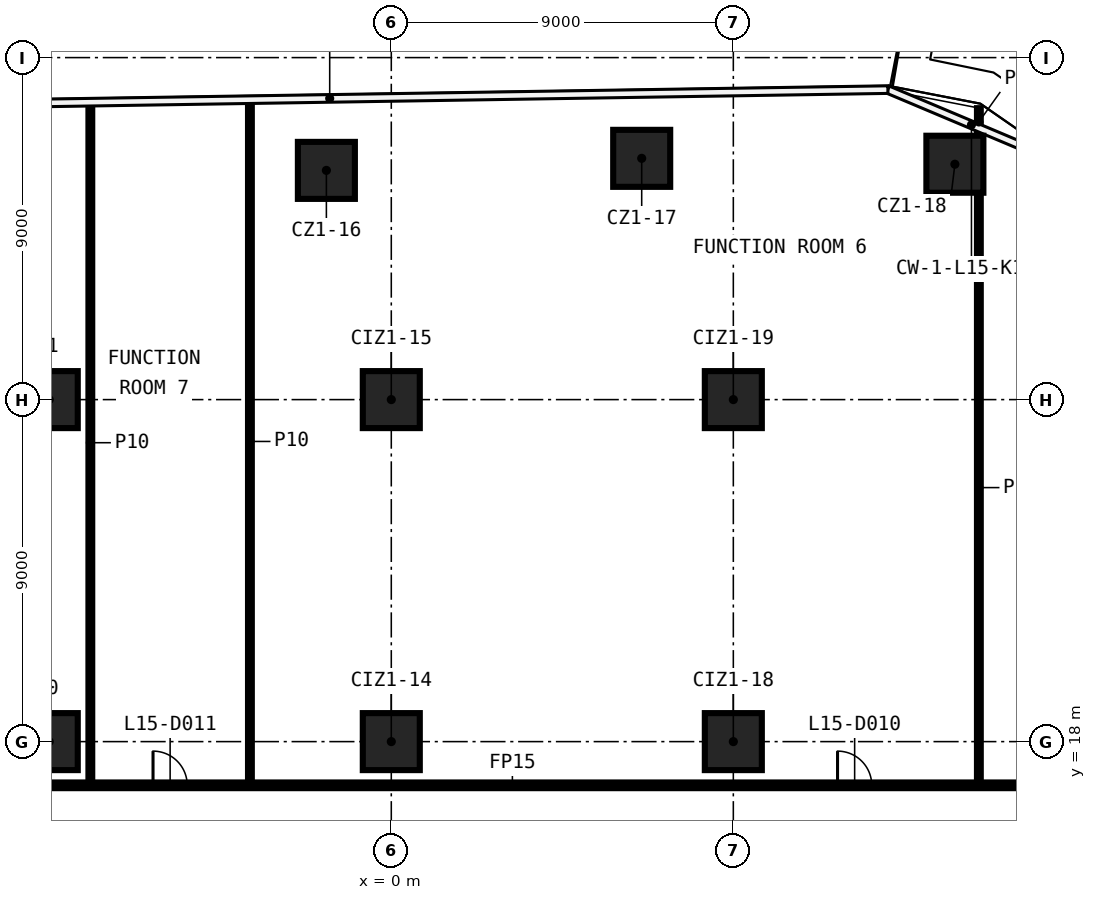
"""IFC4 building model, lengths in metres.
Left out: names, types, materials, properties, quantities, classifications, styles, units other than length and angle.
Written with IfcOpenShell. Run it as: python <this file> out.ifc"""

import sys

from ifc_helpers import new_model, si_unit, direction, frame, frame_2d, origin, origin_2d, place, context, subcontext, project, spatial, rectangle, extrude, element, fill, save


model = new_model("IFC4")
c1 = context("Model", 3, precision=1e-05, world=origin(), true_north=direction((0.0, 1.0)))
c2 = subcontext(c1, "Body", "Model", "MODEL_VIEW")
j1 = project(units=[si_unit("LENGTHUNIT", "METRE"), si_unit("PLANEANGLEUNIT", "RADIAN")], contexts=[c1])
p1 = place(None, origin())
s1 = spatial("IfcSite", under=j1, at=p1, CompositionType="ELEMENT")
p2 = place(p1, origin())
s2 = spatial("IfcBuilding", under=s1, at=p2, CompositionType="ELEMENT")
p3 = place(p2, frame((0.0, 0.0, 77.3)))
s3 = spatial("IfcBuildingStorey", under=s2, at=p3, CompositionType="ELEMENT", Elevation=77.3)
for number, where, z_axis, x_axis in (
    (1, (-1.708, 33.032, 0.0), (0.0, 0.0, 1.0), (1.0, 0.0, 0.0)),
    (2, (6.589, 33.349, 0.0), (0.0, 0.0, 1.0), (1.0, 0.0, 0.0)),
    (3, (14.83, 33.194, 0.0), (0.0, 0.0, 1.0), (1.0, 0.0, 0.0)),
    (4, (-9.0, 18.0, 0.0), (0.0, 0.0, 1.0), (1.0, 0.0, 0.0)),
    (5, (-9.0, 27.0, 0.0), (0.0, 0.0, 1.0), (1.0, 0.0, 0.0)),
    (6, (0.0, 18.0, 0.0), (0.0, 0.0, 1.0), (1.0, 0.0, 0.0)),
    (7, (0.0, 27.0, 0.0), (0.0, 0.0, 1.0), (1.0, 0.0, 0.0)),
    (8, (9.0, 18.0, 0.0), (0.0, 0.0, 1.0), (1.0, 0.0, 0.0)),
    (9, (9.0, 27.0, 0.0), (0.0, 0.0, 1.0), (1.0, 0.0, 0.0)),
):
    element("IfcColumn", number, at=place(p3, frame(where, z_axis=z_axis, x_axis=x_axis)), inside=s3, PredefinedType="COLUMN", context=c2, shape_type="SweptSolid", body=[
        extrude(rectangle(XDim=1.5, YDim=1.5, at=origin_2d()), origin(), (0.0, 0.0, 1.0), 3.3),
    ])
p4 = place(p3, frame((-19.925, 16.85, 0.0), z_axis=(0.0, 0.0, 1.0), x_axis=(1.0, 0.0, 0.0)))
e10 = element("IfcWall", 10, at=p4, inside=s3, PredefinedType="PARTITIONING", context=c2, shape_type="SweptSolid", body=[
    extrude(rectangle(XDim=39.85, YDim=0.15, at=frame_2d((19.925, 0.0))), origin(), (0.0, 0.0, 1.0), 3.3),
])
p5 = place(p4, frame((31.667, 0.0, 0.0)))
e11 = element("IfcOpeningElement", 11, at=p5, cuts=e10, PredefinedType="OPENING", context=c2, shape_type="SweptSolid", body=[
    extrude(rectangle(XDim=0.9, YDim=2.1, at=frame_2d((0.45, 1.05))), frame((0.0, 0.085, 0.0), z_axis=(0.0, -1.0, 0.0), x_axis=(1.0, 0.0, 0.0)), (0.0, 0.0, 1.0), 0.17),
])
p6 = place(p4, frame((13.656, 0.0, 0.0)))
e12 = element("IfcOpeningElement", 12, at=p6, cuts=e10, PredefinedType="OPENING", context=c2, shape_type="SweptSolid", body=[
    extrude(rectangle(XDim=0.9, YDim=2.1, at=frame_2d((0.45, 1.05))), frame((0.0, 0.085, 0.0), z_axis=(0.0, -1.0, 0.0), x_axis=(1.0, 0.0, 0.0)), (0.0, 0.0, 1.0), 0.17),
])
p7 = place(p3, frame((15.461, 16.925, 0.0), z_axis=(0.0, 0.0, 1.0), x_axis=(0.0, 1.0, 0.0)))
e13 = element("IfcWall", 13, at=p7, inside=s3, PredefinedType="PARTITIONING", context=c2, shape_type="SweptSolid", body=[
    extrude(rectangle(XDim=15.519, YDim=0.1, at=frame_2d((7.76, 0.0))), origin(), (0.0, 0.0, 1.0), 3.3),
])
p8 = place(p3, frame((15.461, 33.944, 0.0), z_axis=(0.0, 0.0, 1.0), x_axis=(0.0, 1.0, 0.0)))
e14 = element("IfcWall", 14, at=p8, inside=s3, PredefinedType="PARTITIONING", context=c2, shape_type="SweptSolid", body=[
    extrude(rectangle(XDim=0.725, YDim=0.1, at=frame_2d((0.363, 0.0))), origin(), (0.0, 0.0, 1.0), 3.3),
])
p9 = place(p3, frame((-3.72, 16.925, 0.0), z_axis=(0.0, 0.0, 1.0), x_axis=(0.0, 1.0, 0.0)))
e15 = element("IfcWall", 15, at=p9, inside=s3, PredefinedType="PARTITIONING", context=c2, shape_type="SweptSolid", body=[
    extrude(rectangle(XDim=17.948, YDim=0.1, at=frame_2d((8.974, 0.0))), origin(), (0.0, 0.0, 1.0), 3.3),
])
p10 = place(p3, frame((-7.919, 16.925, 0.0), z_axis=(0.0, 0.0, 1.0), x_axis=(0.0, 1.0, 0.0)))
e16 = element("IfcWall", 16, at=p10, inside=s3, PredefinedType="PARTITIONING", context=c2, shape_type="SweptSolid", body=[
    extrude(rectangle(XDim=17.881, YDim=0.1, at=frame_2d((8.941, 0.0))), origin(), (0.0, 0.0, 1.0), 3.3),
])
p11 = place(p5, origin())
e17 = element("IfcDoor", 17, at=p11, inside=s3, OperationType="SINGLE_SWING_LEFT", PredefinedType="DOOR", context=c2, shape_type="SweptSolid", body=[
    extrude(rectangle(XDim=0.9, YDim=2.1, at=frame_2d((0.45, 1.05))), frame((0.0, 0.025, 0.0), z_axis=(0.0, -1.0, 0.0), x_axis=(1.0, 0.0, 0.0)), (0.0, 0.0, 1.0), 0.05),
])
fill(e11, e17)
p12 = place(p6, origin())
e18 = element("IfcDoor", 18, at=p12, inside=s3, OperationType="SINGLE_SWING_RIGHT", PredefinedType="DOOR", context=c2, shape_type="SweptSolid", body=[
    extrude(rectangle(XDim=0.9, YDim=2.1, at=frame_2d((0.45, 1.05))), frame((0.0, 0.025, 0.0), z_axis=(0.0, -1.0, 0.0), x_axis=(1.0, 0.0, 0.0)), (0.0, 0.0, 1.0), 0.05),
])
fill(e12, e18)
save(model, sys.argv[1])
